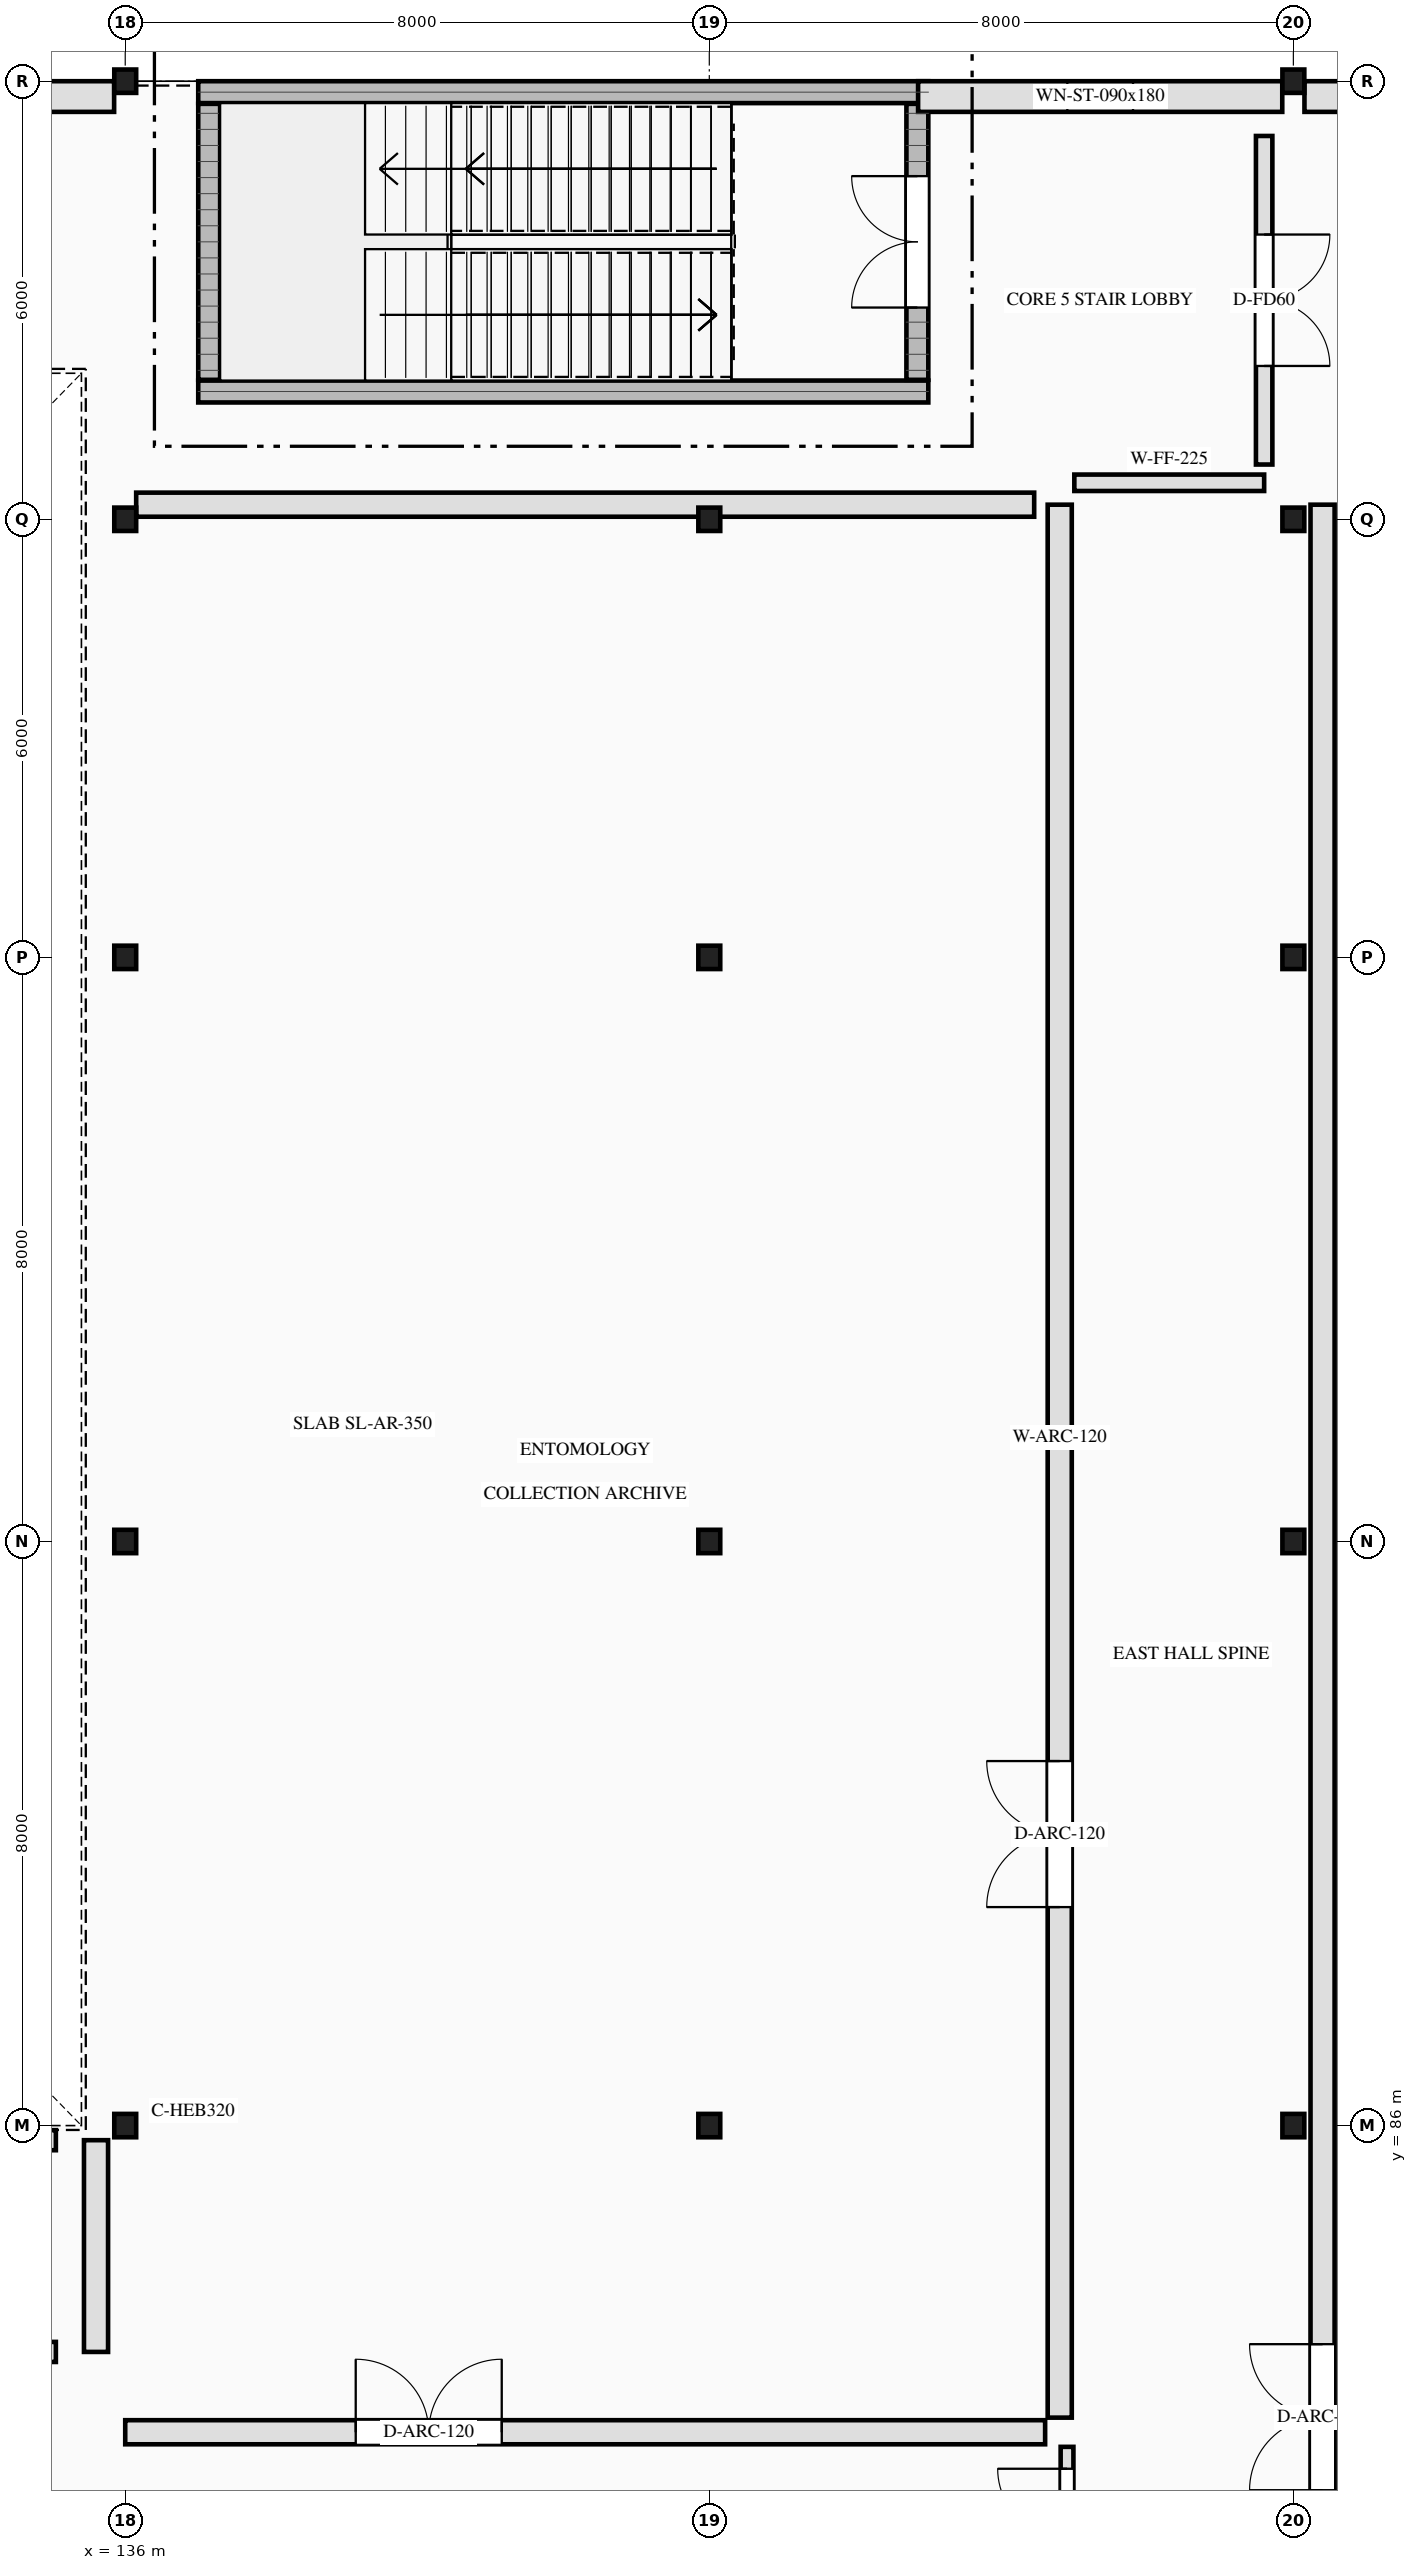
"""IFC4 building model, lengths in metres.
Left out: names, types, materials, properties, quantities, classifications, styles, units other than length and angle.
Written with IfcOpenShell. Run it as: python <this file> out.ifc"""

import sys

from ifc_helpers import new_model, si_unit, direction, frame, frame_2d, origin, origin_2d, place, context, subcontext, project, spatial, rectangle, i_section, extrude, element, fill, save


model = new_model("IFC4")
c1 = context("Model", 3, precision=1e-05, world=origin(), true_north=direction((0.0, 1.0)))
c2 = subcontext(c1, "Body", "Model", "MODEL_VIEW")
j1 = project(units=[si_unit("LENGTHUNIT", "METRE"), si_unit("PLANEANGLEUNIT", "RADIAN")], contexts=[c1])
p1 = place(None, origin())
s1 = spatial("IfcSite", under=j1, at=p1, CompositionType="ELEMENT")
p2 = place(p1, origin())
s2 = spatial("IfcBuilding", under=s1, at=p2, CompositionType="ELEMENT")
p3 = place(p2, frame((0.0, 0.0, 5.4)))
s3 = spatial("IfcBuildingStorey", under=s2, at=p3, CompositionType="ELEMENT", Elevation=5.4)
for number, where, z_axis, x_axis in (
    (1, (137.0, 109.75, 0.0), (0.0, 0.0, 1.0), (1.0, 0.0, 0.0)),
    (2, (137.0, 113.85, 0.0), (0.0, 0.0, 1.0), (1.0, 0.0, 0.0)),
):
    element("IfcWall", number, at=place(p3, frame(where, z_axis=z_axis, x_axis=x_axis)), inside=s3, PredefinedType="SHEAR", context=c2, shape_type="SweptSolid", body=[
        extrude(rectangle(XDim=10.0, YDim=0.3, at=frame_2d((5.0, 0.0))), origin(), (0.0, 0.0, 1.0), 4.2),
    ])
p4 = place(p3, frame((137.15, 109.91, 0.0), z_axis=(0.0, 0.0, 1.0), x_axis=(0.0, 1.0, 0.0)))
e3 = element("IfcWall", 3, at=p4, inside=s3, PredefinedType="SHEAR", context=c2, shape_type="SweptSolid", body=[
    extrude(rectangle(XDim=3.78, YDim=0.3, at=frame_2d((1.89, 0.0))), origin(), (0.0, 0.0, 1.0), 4.2),
])
p5 = place(p3, frame((146.85, 109.91, 0.0), z_axis=(0.0, 0.0, 1.0), x_axis=(0.0, 1.0, 0.0)))
e4 = element("IfcWall", 4, at=p5, inside=s3, PredefinedType="SHEAR", context=c2, shape_type="SweptSolid", body=[
    extrude(rectangle(XDim=3.78, YDim=0.3, at=frame_2d((1.89, 0.0))), origin(), (0.0, 0.0, 1.0), 4.2),
])
p6 = place(p5, frame((0.99, 0.0, 0.0)))
e5 = element("IfcOpeningElement", 5, at=p6, cuts=e4, PredefinedType="OPENING", context=c2, shape_type="SweptSolid", body=[
    extrude(rectangle(XDim=1.8, YDim=2.2, at=frame_2d((0.9, 1.1))), frame((0.0, 0.16, 0.0), z_axis=(0.0, -1.0, 0.0), x_axis=(1.0, 0.0, 0.0)), (0.0, 0.0, 1.0), 0.32),
])
for number, where, z_axis, x_axis in (
    (6, (136.0, 86.0, 0.0), (0.0, 0.0, 1.0), (1.0, 0.0, 0.0)),
    (7, (136.0, 94.0, 0.0), (0.0, 0.0, 1.0), (1.0, 0.0, 0.0)),
    (8, (136.0, 102.0, 0.0), (0.0, 0.0, 1.0), (1.0, 0.0, 0.0)),
    (9, (136.0, 108.0, 0.0), (0.0, 0.0, 1.0), (1.0, 0.0, 0.0)),
    (10, (136.0, 114.0, 0.0), (0.0, 0.0, 1.0), (1.0, 0.0, 0.0)),
    (11, (144.0, 86.0, 0.0), (0.0, 0.0, 1.0), (1.0, 0.0, 0.0)),
    (12, (144.0, 94.0, 0.0), (0.0, 0.0, 1.0), (1.0, 0.0, 0.0)),
    (13, (144.0, 102.0, 0.0), (0.0, 0.0, 1.0), (1.0, 0.0, 0.0)),
    (14, (144.0, 108.0, 0.0), (0.0, 0.0, 1.0), (1.0, 0.0, 0.0)),
    (15, (152.0, 86.0, 0.0), (0.0, 0.0, 1.0), (1.0, 0.0, 0.0)),
    (16, (152.0, 94.0, 0.0), (0.0, 0.0, 1.0), (1.0, 0.0, 0.0)),
    (17, (152.0, 102.0, 0.0), (0.0, 0.0, 1.0), (1.0, 0.0, 0.0)),
    (18, (152.0, 108.0, 0.0), (0.0, 0.0, 1.0), (1.0, 0.0, 0.0)),
    (19, (152.0, 114.0, 0.0), (0.0, 0.0, 1.0), (1.0, 0.0, 0.0)),
):
    element("IfcColumn", number, at=place(p3, frame(where, z_axis=z_axis, x_axis=x_axis)), inside=s3, PredefinedType="COLUMN", context=c2, shape_type="SweptSolid", body=[
        extrude(i_section(OverallWidth=0.3, OverallDepth=0.32, WebThickness=0.011, FlangeThickness=0.021, FilletRadius=0.027, at=origin_2d()), origin(), (0.0, 0.0, 1.0), 4.2),
    ])
p7 = place(p3, frame((128.152, 113.79, 0.0), z_axis=(0.0, 0.0, 1.0), x_axis=(1.0, 0.0, 0.0)))
e20 = element("IfcWall", 20, at=p7, inside=s3, PredefinedType="SOLIDWALL", context=c2, shape_type="SweptSolid", body=[
    extrude(rectangle(XDim=7.696, YDim=0.42, at=frame_2d((3.848, 0.0))), origin(), (0.0, 0.0, 1.0), 3.435),
])
p8 = place(p3, frame((146.86, 113.79, 0.0), z_axis=(0.0, 0.0, 1.0), x_axis=(1.0, 0.0, 0.0)))
e21 = element("IfcWall", 21, at=p8, inside=s3, PredefinedType="SOLIDWALL", context=c2, shape_type="SweptSolid", body=[
    extrude(rectangle(XDim=4.988, YDim=0.42, at=frame_2d((2.494, 0.0))), origin(), (0.0, 0.0, 1.0), 3.435),
])
p9 = place(p8, frame((2.044, 0.0, 0.85)))
e22 = element("IfcOpeningElement", 22, at=p9, cuts=e21, PredefinedType="OPENING", context=c2, shape_type="SweptSolid", body=[
    extrude(rectangle(XDim=0.9, YDim=1.8, at=frame_2d((0.45, 0.9))), frame((0.0, 0.22, 0.0), z_axis=(0.0, -1.0, 0.0), x_axis=(1.0, 0.0, 0.0)), (0.0, 0.0, 1.0), 0.44),
])
p10 = place(p3, frame((152.152, 113.79, 0.0), z_axis=(0.0, 0.0, 1.0), x_axis=(1.0, 0.0, 0.0)))
e23 = element("IfcWall", 23, at=p10, inside=s3, PredefinedType="SOLIDWALL", context=c2, shape_type="SweptSolid", body=[
    extrude(rectangle(XDim=7.696, YDim=0.42, at=frame_2d((3.848, 0.0))), origin(), (0.0, 0.0, 1.0), 3.435),
])
p11 = place(p3, frame((149.0, 108.5, 0.0), z_axis=(0.0, 0.0, 1.0), x_axis=(1.0, 0.0, 0.0)))
e24 = element("IfcWall", 24, at=p11, inside=s3, PredefinedType="SOLIDWALL", context=c2, shape_type="SweptSolid", body=[
    extrude(rectangle(XDim=2.6, YDim=0.225, at=frame_2d((1.3, 0.0))), origin(), (0.0, 0.0, 1.0), 3.94),
])
p12 = place(p3, frame((148.9, 78.4, 0.0), z_axis=(0.0, 0.0, 1.0), x_axis=(0.0, 1.0, 0.0)))
e25 = element("IfcWall", 25, at=p12, inside=s3, PredefinedType="PARTITIONING", context=c2, shape_type="SweptSolid", body=[
    extrude(rectangle(XDim=3.2, YDim=0.175, at=frame_2d((1.6, 0.0))), origin(), (0.0, 0.0, 1.0), 3.94),
])
p13 = place(p12, frame((1.0, 0.0, 0.0)))
e26 = element("IfcOpeningElement", 26, at=p13, cuts=e25, PredefinedType="OPENING", context=c2, shape_type="SweptSolid", body=[
    extrude(rectangle(XDim=1.9, YDim=2.35, at=frame_2d((0.95, 1.175))), frame((0.0, 0.097, 0.0), z_axis=(0.0, -1.0, 0.0), x_axis=(1.0, 0.0, 0.0)), (0.0, 0.0, 1.0), 0.195),
])
p14 = place(p3, frame((148.8, 82.0, 0.0), z_axis=(0.0, 0.0, 1.0), x_axis=(0.0, 1.0, 0.0)))
e27 = element("IfcWall", 27, at=p14, inside=s3, PredefinedType="SOLIDWALL", context=c2, shape_type="SweptSolid", body=[
    extrude(rectangle(XDim=26.2, YDim=0.33, at=frame_2d((13.1, 0.0))), origin(), (0.0, 0.0, 1.0), 3.94),
])
p15 = place(p14, frame((6.992, 0.0, 0.0)))
e28 = element("IfcOpeningElement", 28, at=p15, cuts=e27, PredefinedType="OPENING", context=c2, shape_type="SweptSolid", body=[
    extrude(rectangle(XDim=2.0, YDim=2.5, at=frame_2d((1.0, 1.25))), frame((0.0, 0.175, 0.0), z_axis=(0.0, -1.0, 0.0), x_axis=(1.0, 0.0, 0.0)), (0.0, 0.0, 1.0), 0.35),
])
p16 = place(p3, frame((152.4, 48.8, 0.0), z_axis=(0.0, 0.0, 1.0), x_axis=(0.0, 1.0, 0.0)))
e29 = element("IfcWall", 29, at=p16, inside=s3, PredefinedType="SOLIDWALL", context=c2, shape_type="SweptSolid", body=[
    extrude(rectangle(XDim=59.4, YDim=0.33, at=frame_2d((29.7, 0.0))), origin(), (0.0, 0.0, 1.0), 3.94),
])
p17 = place(p16, frame((32.206, 0.0, 0.0)))
e30 = element("IfcOpeningElement", 30, at=p17, cuts=e29, PredefinedType="OPENING", context=c2, shape_type="SweptSolid", body=[
    extrude(rectangle(XDim=2.0, YDim=2.5, at=frame_2d((1.0, 1.25))), frame((0.0, 0.175, 0.0), z_axis=(0.0, -1.0, 0.0), x_axis=(1.0, 0.0, 0.0)), (0.0, 0.0, 1.0), 0.35),
])
p18 = place(p3, frame((136.0, 81.8, 0.0), z_axis=(0.0, 0.0, 1.0), x_axis=(1.0, 0.0, 0.0)))
e31 = element("IfcWall", 31, at=p18, inside=s3, PredefinedType="SOLIDWALL", context=c2, shape_type="SweptSolid", body=[
    extrude(rectangle(XDim=12.6, YDim=0.33, at=frame_2d((6.3, 0.0))), origin(), (0.0, 0.0, 1.0), 3.94),
])
p19 = place(p18, frame((3.157, 0.0, 0.0)))
e32 = element("IfcOpeningElement", 32, at=p19, cuts=e31, PredefinedType="OPENING", context=c2, shape_type="SweptSolid", body=[
    extrude(rectangle(XDim=2.0, YDim=2.5, at=frame_2d((1.0, 1.25))), frame((0.0, 0.175, 0.0), z_axis=(0.0, -1.0, 0.0), x_axis=(1.0, 0.0, 0.0)), (0.0, 0.0, 1.0), 0.35),
])
p20 = place(p3, frame((135.6, 82.9, 0.0), z_axis=(0.0, 0.0, 1.0), x_axis=(0.0, 1.0, 0.0)))
e33 = element("IfcWall", 33, at=p20, inside=s3, PredefinedType="SOLIDWALL", context=c2, shape_type="SweptSolid", body=[
    extrude(rectangle(XDim=2.9, YDim=0.33, at=frame_2d((1.45, 0.0))), origin(), (0.0, 0.0, 1.0), 3.94),
])
p21 = place(p3, frame((151.6, 113.25, 0.0), z_axis=(0.0, 0.0, 1.0), x_axis=(0.0, -1.0, 0.0)))
e34 = element("IfcWall", 34, at=p21, inside=s3, PredefinedType="SOLIDWALL", context=c2, shape_type="SweptSolid", body=[
    extrude(rectangle(XDim=4.5, YDim=0.225, at=frame_2d((2.25, 0.0))), origin(), (0.0, 0.0, 1.0), 3.94),
])
p22 = place(p21, frame((1.35, 0.0, 0.0)))
e35 = element("IfcOpeningElement", 35, at=p22, cuts=e34, PredefinedType="OPENING", context=c2, shape_type="SweptSolid", body=[
    extrude(rectangle(XDim=1.8, YDim=2.2, at=frame_2d((0.9, 1.1))), frame((0.0, 0.123, 0.0), z_axis=(0.0, -1.0, 0.0), x_axis=(1.0, 0.0, 0.0)), (0.0, 0.0, 1.0), 0.245),
])
p23 = place(p3, frame((136.15, 108.2, 0.0), z_axis=(0.0, 0.0, 1.0), x_axis=(1.0, 0.0, 0.0)))
e36 = element("IfcWall", 36, at=p23, inside=s3, PredefinedType="SOLIDWALL", context=c2, shape_type="SweptSolid", body=[
    extrude(rectangle(XDim=12.3, YDim=0.33, at=frame_2d((6.15, 0.0))), origin(), (0.0, 0.0, 1.0), 3.4),
])
p24 = place(p3, frame((104.35, 82.9, 0.0), z_axis=(0.0, 0.0, 1.0), x_axis=(1.0, 0.0, 0.0)))
e37 = element("IfcWall", 37, at=p24, inside=s3, PredefinedType="SOLIDWALL", context=c2, shape_type="SweptSolid", body=[
    extrude(rectangle(XDim=30.7, YDim=0.275, at=frame_2d((15.35, 0.0))), origin(), (0.0, 0.0, 1.0), 3.94),
])
p25 = place(p24, frame((10.93, 0.0, 0.0)))
e38 = element("IfcOpeningElement", 38, at=p25, cuts=e37, PredefinedType="OPENING", context=c2, shape_type="SweptSolid", body=[
    extrude(rectangle(XDim=1.4, YDim=2.2, at=frame_2d((0.7, 1.1))), frame((0.0, 0.147, 0.0), z_axis=(0.0, -1.0, 0.0), x_axis=(1.0, 0.0, 0.0)), (0.0, 0.0, 1.0), 0.295),
])
p26 = place(p3, frame((104.35, 85.8, 0.0), z_axis=(0.0, 0.0, 1.0), x_axis=(1.0, 0.0, 0.0)))
e39 = element("IfcWall", 39, at=p26, inside=s3, PredefinedType="SOLIDWALL", context=c2, shape_type="SweptSolid", body=[
    extrude(rectangle(XDim=30.7, YDim=0.275, at=frame_2d((15.35, 0.0))), origin(), (0.0, 0.0, 1.0), 3.3),
])
p27 = place(p9, origin())
e40 = element("IfcWindow", 40, at=p27, inside=s3, PartitioningType="SINGLE_PANEL", PredefinedType="WINDOW", context=c2, shape_type="SweptSolid", body=[
    extrude(rectangle(XDim=0.9, YDim=1.8, at=frame_2d((0.45, 0.9))), frame((0.0, 0.03, 0.0), z_axis=(0.0, -1.0, 0.0), x_axis=(1.0, 0.0, 0.0)), (0.0, 0.0, 1.0), 0.06),
])
fill(e22, e40)
p28 = place(p6, origin())
e41 = element("IfcDoor", 41, at=p28, inside=s3, OperationType="DOUBLE_DOOR_SINGLE_SWING", PredefinedType="DOOR", context=c2, shape_type="SweptSolid", body=[
    extrude(rectangle(XDim=1.8, YDim=2.2, at=frame_2d((0.9, 1.1))), frame((0.0, 0.025, 0.0), z_axis=(0.0, -1.0, 0.0), x_axis=(1.0, 0.0, 0.0)), (0.0, 0.0, 1.0), 0.05),
])
fill(e5, e41)
p29 = place(p13, origin())
e42 = element("IfcDoor", 42, at=p29, inside=s3, OperationType="DOUBLE_DOOR_SINGLE_SWING", PredefinedType="DOOR", context=c2, shape_type="SweptSolid", body=[
    extrude(rectangle(XDim=1.9, YDim=2.35, at=frame_2d((0.95, 1.175))), frame((0.0, 0.025, 0.0), z_axis=(0.0, -1.0, 0.0), x_axis=(1.0, 0.0, 0.0)), (0.0, 0.0, 1.0), 0.05),
])
fill(e26, e42)
p30 = place(p15, origin())
e43 = element("IfcDoor", 43, at=p30, inside=s3, OperationType="DOUBLE_DOOR_SINGLE_SWING", PredefinedType="DOOR", context=c2, shape_type="SweptSolid", body=[
    extrude(rectangle(XDim=2.0, YDim=2.5, at=frame_2d((1.0, 1.25))), frame((0.0, 0.025, 0.0), z_axis=(0.0, -1.0, 0.0), x_axis=(1.0, 0.0, 0.0)), (0.0, 0.0, 1.0), 0.05),
])
fill(e28, e43)
p31 = place(p17, origin())
e44 = element("IfcDoor", 44, at=p31, inside=s3, OperationType="DOUBLE_DOOR_SINGLE_SWING", PredefinedType="DOOR", context=c2, shape_type="SweptSolid", body=[
    extrude(rectangle(XDim=2.0, YDim=2.5, at=frame_2d((1.0, 1.25))), frame((0.0, 0.025, 0.0), z_axis=(0.0, -1.0, 0.0), x_axis=(1.0, 0.0, 0.0)), (0.0, 0.0, 1.0), 0.05),
])
fill(e30, e44)
p32 = place(p19, origin())
e45 = element("IfcDoor", 45, at=p32, inside=s3, OperationType="DOUBLE_DOOR_SINGLE_SWING", PredefinedType="DOOR", context=c2, shape_type="SweptSolid", body=[
    extrude(rectangle(XDim=2.0, YDim=2.5, at=frame_2d((1.0, 1.25))), frame((0.0, 0.025, 0.0), z_axis=(0.0, -1.0, 0.0), x_axis=(1.0, 0.0, 0.0)), (0.0, 0.0, 1.0), 0.05),
])
fill(e32, e45)
p33 = place(p22, origin())
e46 = element("IfcDoor", 46, at=p33, inside=s3, OperationType="DOUBLE_DOOR_SINGLE_SWING", PredefinedType="DOOR", context=c2, shape_type="SweptSolid", body=[
    extrude(rectangle(XDim=1.8, YDim=2.2, at=frame_2d((0.9, 1.1))), frame((0.0, 0.025, 0.0), z_axis=(0.0, -1.0, 0.0), x_axis=(1.0, 0.0, 0.0)), (0.0, 0.0, 1.0), 0.05),
])
fill(e35, e46)
save(model, sys.argv[1])
